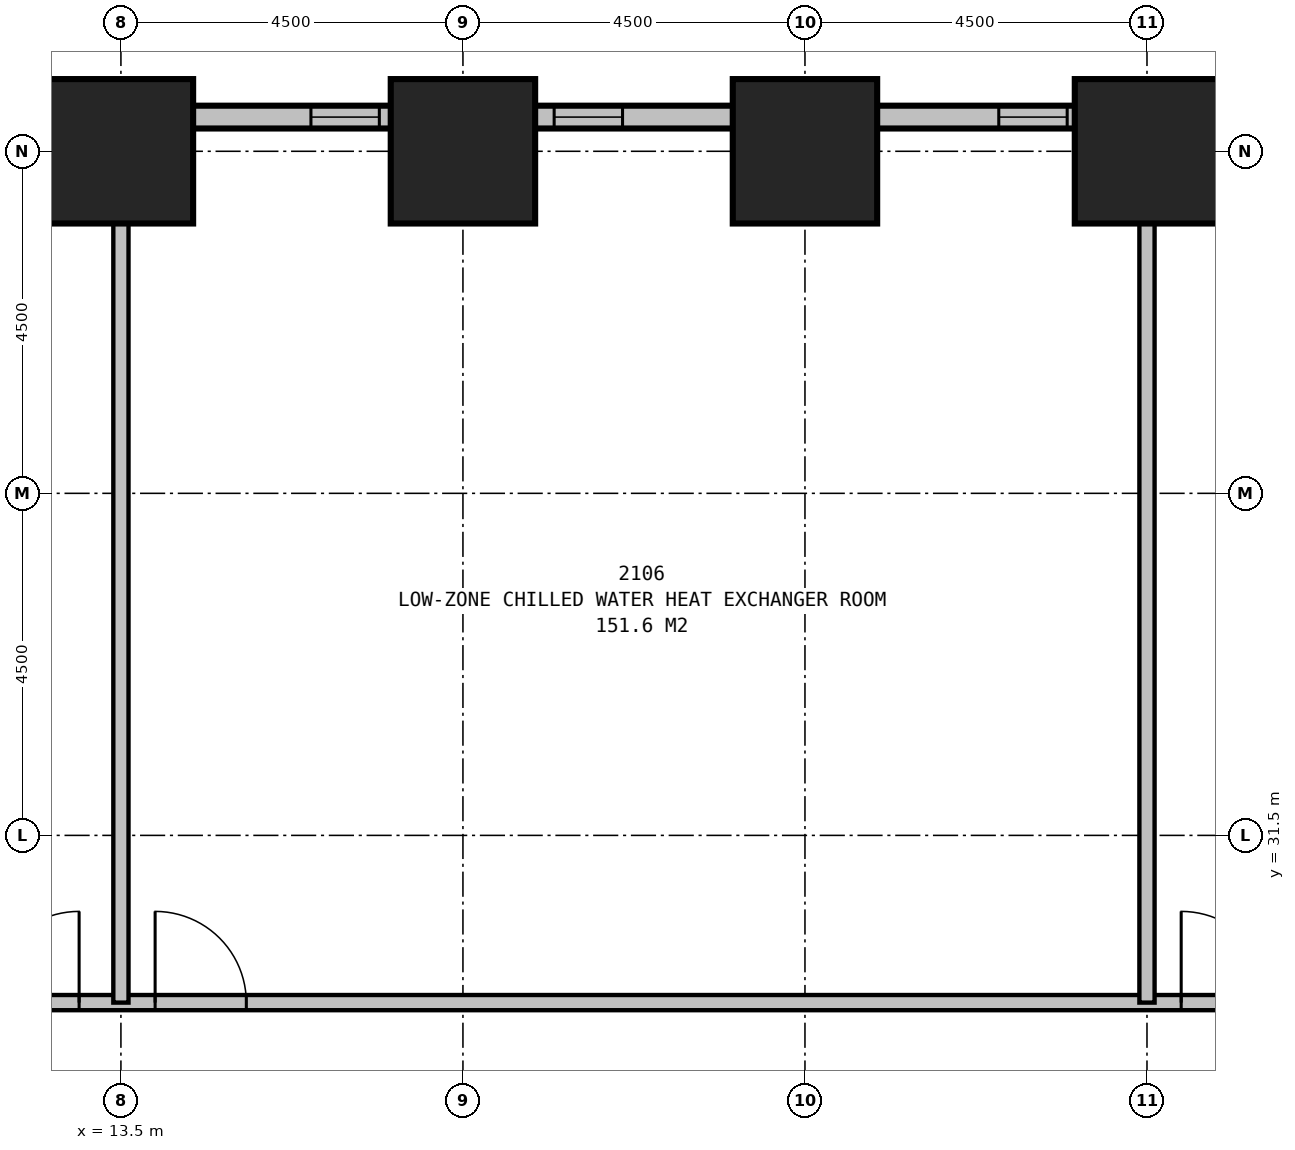
"""IFC4 building model, lengths in metres.
Left out: names, types, materials, properties, quantities, classifications, styles, units other than length and angle.
Written with IfcOpenShell. Run it as: python <this file> out.ifc"""

import sys

from ifc_helpers import new_model, si_unit, direction, frame, frame_2d, origin, origin_2d, place, context, subcontext, project, spatial, rectangle, extrude, element, fill, save


model = new_model("IFC4")
c1 = context("Model", 3, precision=1e-05, world=origin(), true_north=direction((0.0, 1.0)))
c2 = subcontext(c1, "Body", "Model", "MODEL_VIEW")
j1 = project(units=[si_unit("LENGTHUNIT", "METRE"), si_unit("PLANEANGLEUNIT", "RADIAN")], contexts=[c1])
p1 = place(None, origin())
s1 = spatial("IfcSite", under=j1, at=p1, CompositionType="ELEMENT")
p2 = place(p1, origin())
s2 = spatial("IfcBuilding", under=s1, at=p2, CompositionType="ELEMENT")
p3 = place(p2, frame((0.0, 0.0, 85.7)))
s3 = spatial("IfcBuildingStorey", under=s2, at=p3, CompositionType="ELEMENT", Elevation=85.7)
for number, where, z_axis, x_axis in (
    (1, (27.0, 40.5, 0.0), (0.0, 0.0, 1.0), (1.0, 0.0, 0.0)),
    (2, (22.5, 40.5, 0.0), (0.0, 0.0, 1.0), (1.0, 0.0, 0.0)),
    (3, (18.0, 40.5, 0.0), (0.0, 0.0, 1.0), (1.0, 0.0, 0.0)),
    (4, (13.5, 40.5, 0.0), (0.0, 0.0, 1.0), (1.0, 0.0, 0.0)),
):
    element("IfcColumn", number, at=place(p3, frame(where, z_axis=z_axis, x_axis=x_axis)), inside=s3, PredefinedType="COLUMN", context=c2, shape_type="SweptSolid", body=[
        extrude(rectangle(XDim=1.9, YDim=1.9, at=origin_2d()), origin(), (0.0, 0.0, 1.0), 4.2),
    ])
p4 = place(p3, frame((41.1, 40.95, 0.0), z_axis=(0.0, 0.0, 1.0), x_axis=(-1.0, 0.0, 0.0)))
e5 = element("IfcWall", 5, at=p4, inside=s3, PredefinedType="STANDARD", context=c2, shape_type="SweptSolid", body=[
    extrude(rectangle(XDim=32.7, YDim=0.3, at=frame_2d((16.35, 0.0))), origin(), (0.0, 0.0, 1.0), 2.85),
])
p5 = place(p4, frame((3.0, 0.0, 0.5)))
e6 = element("IfcOpeningElement", 6, at=p5, cuts=e5, PredefinedType="OPENING", context=c2, shape_type="SweptSolid", body=[
    extrude(rectangle(XDim=0.9, YDim=1.2, at=frame_2d((0.45, 0.6))), frame((0.0, 0.16, 0.0), z_axis=(0.0, -1.0, 0.0), x_axis=(1.0, 0.0, 0.0)), (0.0, 0.0, 1.0), 0.32),
])
p6 = place(p4, frame((6.15, 0.0, 0.5)))
e7 = element("IfcOpeningElement", 7, at=p6, cuts=e5, PredefinedType="OPENING", context=c2, shape_type="SweptSolid", body=[
    extrude(rectangle(XDim=0.9, YDim=1.2, at=frame_2d((0.45, 0.6))), frame((0.0, 0.16, 0.0), z_axis=(0.0, -1.0, 0.0), x_axis=(1.0, 0.0, 0.0)), (0.0, 0.0, 1.0), 0.32),
])
p7 = place(p4, frame((12.0, 0.0, 0.5)))
e8 = element("IfcOpeningElement", 8, at=p7, cuts=e5, PredefinedType="OPENING", context=c2, shape_type="SweptSolid", body=[
    extrude(rectangle(XDim=0.9, YDim=1.2, at=frame_2d((0.45, 0.6))), frame((0.0, 0.16, 0.0), z_axis=(0.0, -1.0, 0.0), x_axis=(1.0, 0.0, 0.0)), (0.0, 0.0, 1.0), 0.32),
])
p8 = place(p4, frame((15.15, 0.0, 0.5)))
e9 = element("IfcOpeningElement", 9, at=p8, cuts=e5, PredefinedType="OPENING", context=c2, shape_type="SweptSolid", body=[
    extrude(rectangle(XDim=0.9, YDim=1.2, at=frame_2d((0.45, 0.6))), frame((0.0, 0.16, 0.0), z_axis=(0.0, -1.0, 0.0), x_axis=(1.0, 0.0, 0.0)), (0.0, 0.0, 1.0), 0.32),
])
p9 = place(p4, frame((21.0, 0.0, 0.5)))
e10 = element("IfcOpeningElement", 10, at=p9, cuts=e5, PredefinedType="OPENING", context=c2, shape_type="SweptSolid", body=[
    extrude(rectangle(XDim=0.9, YDim=1.2, at=frame_2d((0.45, 0.6))), frame((0.0, 0.16, 0.0), z_axis=(0.0, -1.0, 0.0), x_axis=(1.0, 0.0, 0.0)), (0.0, 0.0, 1.0), 0.32),
])
p10 = place(p4, frame((24.2, 0.0, 0.5)))
e11 = element("IfcOpeningElement", 11, at=p10, cuts=e5, PredefinedType="OPENING", context=c2, shape_type="SweptSolid", body=[
    extrude(rectangle(XDim=0.9, YDim=1.2, at=frame_2d((0.45, 0.6))), frame((0.0, 0.16, 0.0), z_axis=(0.0, -1.0, 0.0), x_axis=(1.0, 0.0, 0.0)), (0.0, 0.0, 1.0), 0.32),
])
p11 = place(p4, frame((30.0, 0.0, 0.5)))
e12 = element("IfcOpeningElement", 12, at=p11, cuts=e5, PredefinedType="OPENING", context=c2, shape_type="SweptSolid", body=[
    extrude(rectangle(XDim=0.9, YDim=1.2, at=frame_2d((0.45, 0.6))), frame((0.0, 0.16, 0.0), z_axis=(0.0, -1.0, 0.0), x_axis=(1.0, 0.0, 0.0)), (0.0, 0.0, 1.0), 0.32),
])
p12 = place(p3, frame((11.2, 29.3, 0.0), z_axis=(0.0, 0.0, 1.0), x_axis=(1.0, 0.0, 0.0)))
e13 = element("IfcWall", 13, at=p12, inside=s3, PredefinedType="PARTITIONING", context=c2, shape_type="SweptSolid", body=[
    extrude(rectangle(XDim=27.1, YDim=0.2, at=frame_2d((13.55, 0.0))), origin(), (0.0, 0.0, 1.0), 3.95),
])
p13 = place(p12, frame((2.75, 0.0, 0.0)))
e14 = element("IfcOpeningElement", 14, at=p13, cuts=e13, PredefinedType="OPENING", context=c2, shape_type="SweptSolid", body=[
    extrude(rectangle(XDim=1.2, YDim=2.1, at=frame_2d((0.6, 1.05))), frame((0.0, 0.11, 0.0), z_axis=(0.0, -1.0, 0.0), x_axis=(1.0, 0.0, 0.0)), (0.0, 0.0, 1.0), 0.22),
])
p14 = place(p12, frame((16.25, 0.0, 0.0)))
e15 = element("IfcOpeningElement", 15, at=p14, cuts=e13, PredefinedType="OPENING", context=c2, shape_type="SweptSolid", body=[
    extrude(rectangle(XDim=1.2, YDim=2.1, at=frame_2d((0.6, 1.05))), frame((0.0, 0.11, 0.0), z_axis=(0.0, -1.0, 0.0), x_axis=(1.0, 0.0, 0.0)), (0.0, 0.0, 1.0), 0.22),
])
p15 = place(p12, frame((0.55, 0.0, 0.0)))
e16 = element("IfcOpeningElement", 16, at=p15, cuts=e13, PredefinedType="OPENING", context=c2, shape_type="SweptSolid", body=[
    extrude(rectangle(XDim=1.2, YDim=2.1, at=frame_2d((0.6, 1.05))), frame((0.0, 0.11, 0.0), z_axis=(0.0, -1.0, 0.0), x_axis=(1.0, 0.0, 0.0)), (0.0, 0.0, 1.0), 0.22),
])
p16 = place(p12, frame((25.35, 0.0, 0.0)))
e17 = element("IfcOpeningElement", 17, at=p16, cuts=e13, PredefinedType="OPENING", context=c2, shape_type="SweptSolid", body=[
    extrude(rectangle(XDim=1.2, YDim=2.1, at=frame_2d((0.6, 1.05))), frame((0.0, 0.11, 0.0), z_axis=(0.0, -1.0, 0.0), x_axis=(1.0, 0.0, 0.0)), (0.0, 0.0, 1.0), 0.22),
])
for number, where, z_axis, x_axis in (
    (18, (13.5, 29.3, 0.0), (0.0, 0.0, 1.0), (0.0, 1.0, 0.0)),
    (19, (27.0, 29.3, 0.0), (0.0, 0.0, 1.0), (0.0, 1.0, 0.0)),
):
    element("IfcWall", number, at=place(p3, frame(where, z_axis=z_axis, x_axis=x_axis)), inside=s3, PredefinedType="PARTITIONING", context=c2, shape_type="SweptSolid", body=[
        extrude(rectangle(XDim=10.25, YDim=0.2, at=frame_2d((5.125, 0.0))), origin(), (0.0, 0.0, 1.0), 2.95),
    ])
p17 = place(p8, origin())
e20 = element("IfcWindow", 20, at=p17, inside=s3, PartitioningType="SINGLE_PANEL", PredefinedType="USERDEFINED", context=c2, shape_type="SweptSolid", body=[
    extrude(rectangle(XDim=0.9, YDim=1.2, at=frame_2d((0.45, 0.6))), frame((0.0, 0.03, 0.0), z_axis=(0.0, -1.0, 0.0), x_axis=(1.0, 0.0, 0.0)), (0.0, 0.0, 1.0), 0.06),
])
fill(e9, e20)
p18 = place(p9, origin())
e21 = element("IfcWindow", 21, at=p18, inside=s3, PartitioningType="SINGLE_PANEL", PredefinedType="USERDEFINED", context=c2, shape_type="SweptSolid", body=[
    extrude(rectangle(XDim=0.9, YDim=1.2, at=frame_2d((0.45, 0.6))), frame((0.0, 0.03, 0.0), z_axis=(0.0, -1.0, 0.0), x_axis=(1.0, 0.0, 0.0)), (0.0, 0.0, 1.0), 0.06),
])
fill(e10, e21)
p19 = place(p10, origin())
e22 = element("IfcWindow", 22, at=p19, inside=s3, PartitioningType="SINGLE_PANEL", PredefinedType="USERDEFINED", context=c2, shape_type="SweptSolid", body=[
    extrude(rectangle(XDim=0.9, YDim=1.2, at=frame_2d((0.45, 0.6))), frame((0.0, 0.03, 0.0), z_axis=(0.0, -1.0, 0.0), x_axis=(1.0, 0.0, 0.0)), (0.0, 0.0, 1.0), 0.06),
])
fill(e11, e22)
p20 = place(p13, origin())
e23 = element("IfcDoor", 23, at=p20, inside=s3, OperationType="SINGLE_SWING_LEFT", PredefinedType="DOOR", context=c2, shape_type="SweptSolid", body=[
    extrude(rectangle(XDim=1.2, YDim=2.1, at=frame_2d((0.6, 1.05))), frame((0.0, 0.025, 0.0), z_axis=(0.0, -1.0, 0.0), x_axis=(1.0, 0.0, 0.0)), (0.0, 0.0, 1.0), 0.05),
])
fill(e14, e23)
p21 = place(p14, origin())
e24 = element("IfcDoor", 24, at=p21, inside=s3, OperationType="SINGLE_SWING_LEFT", PredefinedType="DOOR", context=c2, shape_type="SweptSolid", body=[
    extrude(rectangle(XDim=1.2, YDim=2.1, at=frame_2d((0.6, 1.05))), frame((0.0, 0.025, 0.0), z_axis=(0.0, -1.0, 0.0), x_axis=(1.0, 0.0, 0.0)), (0.0, 0.0, 1.0), 0.05),
])
fill(e15, e24)
p22 = place(p15, origin())
e25 = element("IfcDoor", 25, at=p22, inside=s3, OperationType="SINGLE_SWING_RIGHT", PredefinedType="DOOR", context=c2, shape_type="SweptSolid", body=[
    extrude(rectangle(XDim=1.2, YDim=2.1, at=frame_2d((0.6, 1.05))), frame((0.0, 0.025, 0.0), z_axis=(0.0, -1.0, 0.0), x_axis=(1.0, 0.0, 0.0)), (0.0, 0.0, 1.0), 0.05),
])
fill(e16, e25)
save(model, sys.argv[1])
